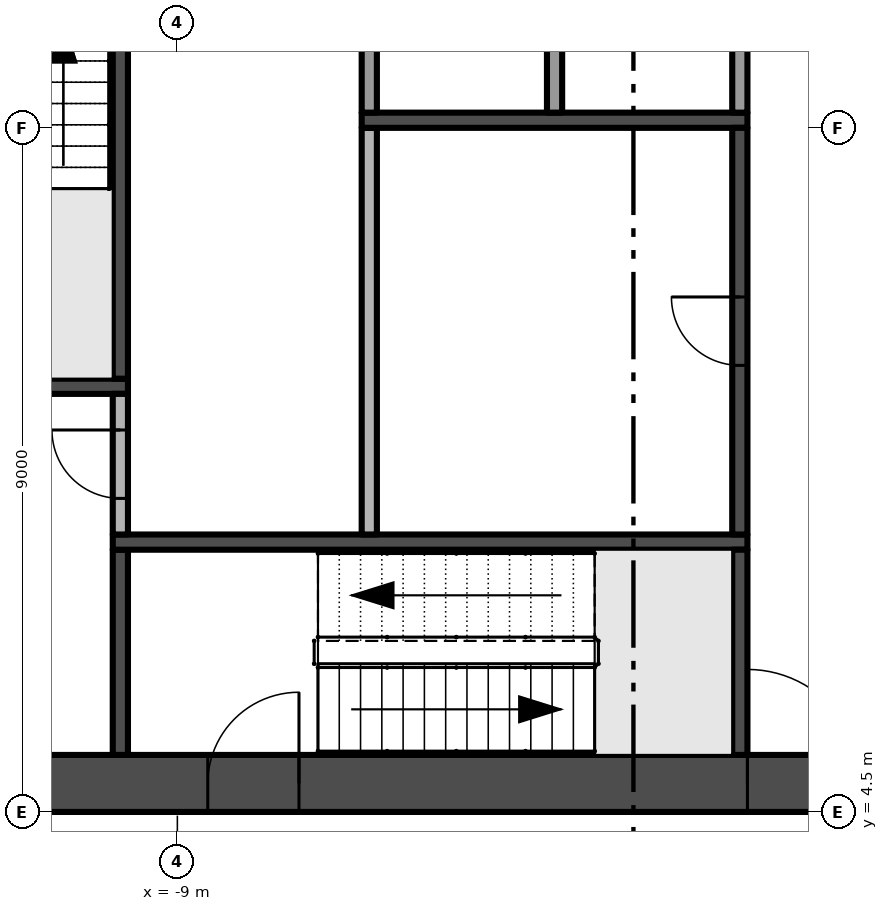
"""IFC4 building model, lengths in metres.
Left out: names, types, materials, properties, quantities, classifications, styles, units other than length and angle.
Written with IfcOpenShell. Run it as: python <this file> out.ifc"""

import sys

from ifc_helpers import new_model, si_unit, direction, frame, frame_2d, origin, place, context, subcontext, project, spatial, rectangle, extrude, element, fill, save


model = new_model("IFC4")
c1 = context("Model", 3, precision=1e-05, world=origin(), true_north=direction((0.0, 1.0)))
c2 = subcontext(c1, "Body", "Model", "MODEL_VIEW")
j1 = project(units=[si_unit("LENGTHUNIT", "METRE"), si_unit("PLANEANGLEUNIT", "RADIAN")], contexts=[c1])
p1 = place(None, origin())
s1 = spatial("IfcSite", under=j1, at=p1, CompositionType="ELEMENT")
p2 = place(p1, origin())
s2 = spatial("IfcBuilding", under=s1, at=p2, CompositionType="ELEMENT")
p3 = place(p2, frame((0.0, 0.0, 179.4)))
s3 = spatial("IfcBuildingStorey", under=s2, at=p3, CompositionType="ELEMENT", Elevation=179.4)
p4 = place(p3, frame((-13.5, 4.875, -0.3), z_axis=(0.0, 0.0, 1.0), x_axis=(1.0, 0.0, 0.0)))
e1 = element("IfcWall", 1, at=p4, inside=s3, PredefinedType="SHEAR", context=c2, shape_type="SweptSolid", body=[
    extrude(rectangle(XDim=27.0, YDim=0.75, at=frame_2d((13.5, 0.0))), origin(), (0.0, 0.0, 1.0), 5.0),
])
p5 = place(p4, frame((12.0, 0.0, 0.3)))
e2 = element("IfcOpeningElement", 2, at=p5, cuts=e1, PredefinedType="OPENING", context=c2, shape_type="SweptSolid", body=[
    extrude(rectangle(XDim=3.0, YDim=2.4, at=frame_2d((1.5, 1.2))), frame((0.0, 0.385, 0.0), z_axis=(0.0, -1.0, 0.0), x_axis=(1.0, 0.0, 0.0)), (0.0, 0.0, 1.0), 0.77),
])
p6 = place(p4, frame((4.9, 0.0, 0.3)))
e3 = element("IfcOpeningElement", 3, at=p6, cuts=e1, PredefinedType="OPENING", context=c2, shape_type="SweptSolid", body=[
    extrude(rectangle(XDim=1.2, YDim=2.2, at=frame_2d((0.6, 1.1))), frame((0.0, 0.385, 0.0), z_axis=(0.0, -1.0, 0.0), x_axis=(1.0, 0.0, 0.0)), (0.0, 0.0, 1.0), 0.77),
])
p7 = place(p4, frame((20.75, 0.0, 0.3)))
e4 = element("IfcOpeningElement", 4, at=p7, cuts=e1, PredefinedType="OPENING", context=c2, shape_type="SweptSolid", body=[
    extrude(rectangle(XDim=1.5, YDim=2.2, at=frame_2d((0.75, 1.1))), frame((0.0, 0.385, 0.0), z_axis=(0.0, -1.0, 0.0), x_axis=(1.0, 0.0, 0.0)), (0.0, 0.0, 1.0), 0.77),
])
p8 = place(p4, frame((17.4, 0.0, 0.3)))
e5 = element("IfcOpeningElement", 5, at=p8, cuts=e1, PredefinedType="OPENING", context=c2, shape_type="SweptSolid", body=[
    extrude(rectangle(XDim=1.2, YDim=2.2, at=frame_2d((0.6, 1.1))), frame((0.0, 0.385, 0.0), z_axis=(0.0, -1.0, 0.0), x_axis=(1.0, 0.0, 0.0)), (0.0, 0.0, 1.0), 0.77),
])
p9 = place(p3, frame((-12.75, 10.1, 0.0), z_axis=(0.0, 0.0, 1.0), x_axis=(1.0, 0.0, 0.0)))
e6 = element("IfcWall", 6, at=p9, inside=s3, PredefinedType="SHEAR", context=c2, shape_type="SweptSolid", body=[
    extrude(rectangle(XDim=3.1, YDim=0.2, at=frame_2d((1.55, 0.0))), origin(), (0.0, 0.0, 1.0), 4.7),
])
p10 = place(p3, frame((-9.75, 5.25, 0.0), z_axis=(0.0, 0.0, 1.0), x_axis=(0.0, 1.0, 0.0)))
e7 = element("IfcWall", 7, at=p10, inside=s3, PredefinedType="SHEAR", context=c2, shape_type="SweptSolid", body=[
    extrude(rectangle(XDim=2.7, YDim=0.2, at=frame_2d((1.35, 0.0))), origin(), (0.0, 0.0, 1.0), 4.7),
])
p11 = place(p3, frame((-9.85, 8.05, 0.0), z_axis=(0.0, 0.0, 1.0), x_axis=(1.0, 0.0, 0.0)))
e8 = element("IfcWall", 8, at=p11, inside=s3, PredefinedType="SHEAR", context=c2, shape_type="SweptSolid", body=[
    extrude(rectangle(XDim=8.35, YDim=0.2, at=frame_2d((4.175, 0.0))), origin(), (0.0, 0.0, 1.0), 4.7),
])
p12 = place(p3, frame((-9.75, 8.15, 0.0), z_axis=(0.0, 0.0, 1.0), x_axis=(0.0, 1.0, 0.0)))
e9 = element("IfcWall", 9, at=p12, inside=s3, PredefinedType="PARTITIONING", context=c2, shape_type="SweptSolid", body=[
    extrude(rectangle(XDim=1.85, YDim=0.2, at=frame_2d((0.925, 0.0))), origin(), (0.0, 0.0, 1.0), 4.7),
])
p13 = place(p12, frame((0.475, 0.0, 0.0)))
e10 = element("IfcOpeningElement", 10, at=p13, cuts=e9, PredefinedType="OPENING", context=c2, shape_type="SweptSolid", body=[
    extrude(rectangle(XDim=0.9, YDim=2.1, at=frame_2d((0.45, 1.05))), frame((0.0, 0.11, 0.0), z_axis=(0.0, -1.0, 0.0), x_axis=(1.0, 0.0, 0.0)), (0.0, 0.0, 1.0), 0.22),
])
p14 = place(p3, frame((-9.75, 10.2, 0.0), z_axis=(0.0, 0.0, 1.0), x_axis=(0.0, 1.0, 0.0)))
e11 = element("IfcWall", 11, at=p14, inside=s3, PredefinedType="SHEAR", context=c2, shape_type="SweptSolid", body=[
    extrude(rectangle(XDim=5.7, YDim=0.2, at=frame_2d((2.85, 0.0))), origin(), (0.0, 0.0, 1.0), 4.7),
])
p15 = place(p3, frame((-6.475, 8.15, 0.0), z_axis=(0.0, 0.0, 1.0), x_axis=(0.0, 1.0, 0.0)))
e12 = element("IfcWall", 12, at=p15, inside=s3, PredefinedType="PARTITIONING", context=c2, shape_type="SweptSolid", body=[
    extrude(rectangle(XDim=5.35, YDim=0.2, at=frame_2d((2.675, 0.0))), origin(), (0.0, 0.0, 1.0), 4.7),
])
p16 = place(p3, frame((-6.575, 13.6, 0.0), z_axis=(0.0, 0.0, 1.0), x_axis=(1.0, 0.0, 0.0)))
e13 = element("IfcWall", 13, at=p16, inside=s3, PredefinedType="SHEAR", context=c2, shape_type="SweptSolid", body=[
    extrude(rectangle(XDim=5.075, YDim=0.2, at=frame_2d((2.538, 0.0))), origin(), (0.0, 0.0, 1.0), 4.7),
])
for number, where, z_axis, x_axis in (
    (14, (-6.475, 13.7, 0.0), (0.0, 0.0, 1.0), (0.0, 1.0, 0.0)),
    (15, (-4.037, 13.7, 0.0), (0.0, 0.0, 1.0), (0.0, 1.0, 0.0)),
):
    element("IfcWall", number, at=place(p3, frame(where, z_axis=z_axis, x_axis=x_axis)), inside=s3, PredefinedType="PARTITIONING", context=c2, shape_type="SweptSolid", body=[
        extrude(rectangle(XDim=2.2, YDim=0.2, at=frame_2d((1.1, 0.0))), origin(), (0.0, 0.0, 1.0), 4.7),
    ])
p17 = place(p3, frame((-1.6, 5.25, 0.0), z_axis=(0.0, 0.0, 1.0), x_axis=(0.0, 1.0, 0.0)))
e16 = element("IfcWall", 16, at=p17, inside=s3, PredefinedType="SHEAR", context=c2, shape_type="SweptSolid", body=[
    extrude(rectangle(XDim=2.7, YDim=0.2, at=frame_2d((1.35, 0.0))), origin(), (0.0, 0.0, 1.0), 4.7),
])
p18 = place(p3, frame((-1.6, 8.15, 0.0), z_axis=(0.0, 0.0, 1.0), x_axis=(0.0, 1.0, 0.0)))
e17 = element("IfcWall", 17, at=p18, inside=s3, PredefinedType="SHEAR", context=c2, shape_type="SweptSolid", body=[
    extrude(rectangle(XDim=5.35, YDim=0.2, at=frame_2d((2.675, 0.0))), origin(), (0.0, 0.0, 1.0), 4.7),
])
p19 = place(p18, frame((2.225, 0.0, 0.0)))
e18 = element("IfcOpeningElement", 18, at=p19, cuts=e17, PredefinedType="OPENING", context=c2, shape_type="SweptSolid", body=[
    extrude(rectangle(XDim=0.9, YDim=2.1, at=frame_2d((0.45, 1.05))), frame((0.0, 0.11, 0.0), z_axis=(0.0, -1.0, 0.0), x_axis=(1.0, 0.0, 0.0)), (0.0, 0.0, 1.0), 0.22),
])
p20 = place(p3, frame((-1.6, 13.7, 0.0), z_axis=(0.0, 0.0, 1.0), x_axis=(0.0, 1.0, 0.0)))
e19 = element("IfcWall", 19, at=p20, inside=s3, PredefinedType="PARTITIONING", context=c2, shape_type="SweptSolid", body=[
    extrude(rectangle(XDim=2.2, YDim=0.2, at=frame_2d((1.1, 0.0))), origin(), (0.0, 0.0, 1.0), 4.7),
])
p21 = place(p5, frame((3.0, 0.0, 0.0), z_axis=(0.0, 0.0, 1.0), x_axis=(-1.0, 0.0, 0.0)))
e20 = element("IfcDoor", 20, at=p21, inside=s3, OperationType="DOUBLE_DOOR_SINGLE_SWING", PredefinedType="DOOR", context=c2, shape_type="SweptSolid", body=[
    extrude(rectangle(XDim=3.0, YDim=2.4, at=frame_2d((1.5, 1.2))), frame((0.0, 0.025, 0.0), z_axis=(0.0, -1.0, 0.0), x_axis=(1.0, 0.0, 0.0)), (0.0, 0.0, 1.0), 0.05),
])
fill(e2, e20)
p22 = place(p6, frame((1.2, 0.0, 0.0), z_axis=(0.0, 0.0, 1.0), x_axis=(-1.0, 0.0, 0.0)))
e21 = element("IfcDoor", 21, at=p22, inside=s3, OperationType="SINGLE_SWING_LEFT", PredefinedType="DOOR", context=c2, shape_type="SweptSolid", body=[
    extrude(rectangle(XDim=1.2, YDim=2.2, at=frame_2d((0.6, 1.1))), frame((0.0, 0.025, 0.0), z_axis=(0.0, -1.0, 0.0), x_axis=(1.0, 0.0, 0.0)), (0.0, 0.0, 1.0), 0.05),
])
fill(e3, e21)
p23 = place(p19, origin())
e22 = element("IfcDoor", 22, at=p23, inside=s3, OperationType="SINGLE_SWING_RIGHT", PredefinedType="DOOR", context=c2, shape_type="SweptSolid", body=[
    extrude(rectangle(XDim=0.9, YDim=2.1, at=frame_2d((0.45, 1.05))), frame((0.0, 0.025, 0.0), z_axis=(0.0, -1.0, 0.0), x_axis=(1.0, 0.0, 0.0)), (0.0, 0.0, 1.0), 0.05),
])
fill(e18, e22)
p24 = place(p13, origin())
e23 = element("IfcDoor", 23, at=p24, inside=s3, OperationType="SINGLE_SWING_RIGHT", PredefinedType="DOOR", context=c2, shape_type="SweptSolid", body=[
    extrude(rectangle(XDim=0.9, YDim=2.1, at=frame_2d((0.45, 1.05))), frame((0.0, 0.025, 0.0), z_axis=(0.0, -1.0, 0.0), x_axis=(1.0, 0.0, 0.0)), (0.0, 0.0, 1.0), 0.05),
])
fill(e10, e23)
save(model, sys.argv[1])
